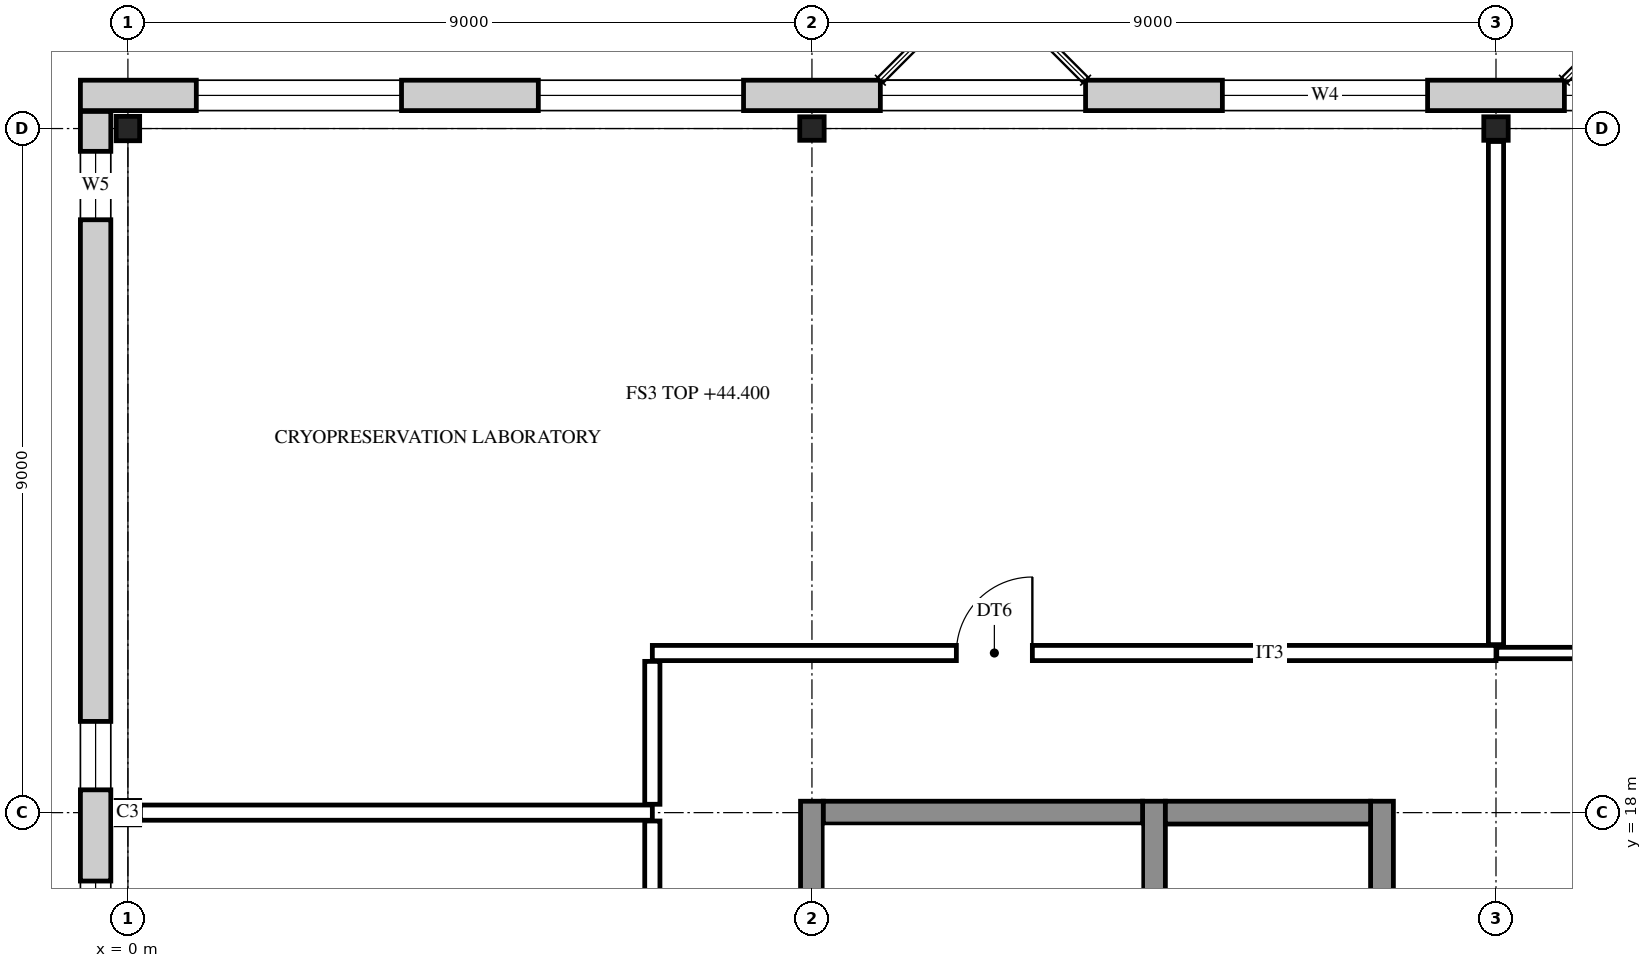
"""IFC4 building model, lengths in metres.
Left out: names, types, materials, properties, quantities, classifications, styles, units other than length and angle.
Written with IfcOpenShell. Run it as: python <this file> out.ifc"""

import sys

from ifc_helpers import new_model, si_unit, direction, frame, frame_2d, origin, origin_2d, place, context, subcontext, project, spatial, rectangle, i_section, extrude, element, fill, save


model = new_model("IFC4")
c1 = context("Model", 3, precision=1e-05, world=origin(), true_north=direction((0.0, 1.0)))
c2 = subcontext(c1, "Body", "Model", "MODEL_VIEW")
j1 = project(units=[si_unit("LENGTHUNIT", "METRE"), si_unit("PLANEANGLEUNIT", "RADIAN")], contexts=[c1])
p1 = place(None, origin())
s1 = spatial("IfcSite", under=j1, at=p1, CompositionType="ELEMENT")
p2 = place(p1, origin())
s2 = spatial("IfcBuilding", under=s1, at=p2, CompositionType="ELEMENT")
p3 = place(p2, frame((0.0, 0.0, 44.4)))
s3 = spatial("IfcBuildingStorey", under=s2, at=p3, CompositionType="ELEMENT", Elevation=44.4)
for number, where, z_axis, x_axis in (
    (1, (0.0, 18.0, 0.0), (0.0, 0.0, 1.0), (1.0, 0.0, 0.0)),
    (2, (0.0, 27.0, 0.0), (0.0, 0.0, 1.0), (1.0, 0.0, 0.0)),
    (3, (9.0, 27.0, 0.0), (0.0, 0.0, 1.0), (0.0, 1.0, 0.0)),
    (4, (18.0, 27.0, 0.0), (0.0, 0.0, 1.0), (0.0, 1.0, 0.0)),
):
    element("IfcColumn", number, at=place(p3, frame(where, z_axis=z_axis, x_axis=x_axis)), inside=s3, PredefinedType="COLUMN", context=c2, shape_type="SweptSolid", body=[
        extrude(i_section(OverallWidth=0.309, OverallDepth=0.321, WebThickness=0.014, FlangeThickness=0.022, FilletRadius=0.017, at=origin_2d()), origin(), (0.0, 0.0, 1.0), 4.2),
    ])
for number, where, z_axis, x_axis in (
    (5, (9.0, 8.85, 0.0), (0.0, 0.0, 1.0), (0.0, 1.0, 0.0)),
    (6, (13.5, 8.85, 0.0), (0.0, 0.0, 1.0), (0.0, 1.0, 0.0)),
):
    element("IfcWall", number, at=place(p3, frame(where, z_axis=z_axis, x_axis=x_axis)), inside=s3, PredefinedType="SHEAR", context=c2, shape_type="SweptSolid", body=[
        extrude(rectangle(XDim=9.3, YDim=0.3, at=frame_2d((4.65, 0.0))), origin(), (0.0, 0.0, 1.0), 4.2),
    ])
p4 = place(p3, frame((16.5, 8.85, 0.0), z_axis=(0.0, 0.0, 1.0), x_axis=(0.0, 1.0, 0.0)))
e7 = element("IfcWall", 7, at=p4, inside=s3, PredefinedType="SHEAR", context=c2, shape_type="SweptSolid", body=[
    extrude(rectangle(XDim=9.3, YDim=0.3, at=frame_2d((4.65, 0.0))), origin(), (0.0, 0.0, 1.0), 4.2),
])
p5 = place(p4, frame((1.1, 0.0, 0.0)))
e8 = element("IfcOpeningElement", 8, at=p5, cuts=e7, PredefinedType="OPENING", context=c2, shape_type="SweptSolid", body=[
    extrude(rectangle(XDim=1.1, YDim=2.1, at=frame_2d((0.55, 1.05))), frame((0.0, 0.16, 0.0), z_axis=(0.0, -1.0, 0.0), x_axis=(1.0, 0.0, 0.0)), (0.0, 0.0, 1.0), 0.32),
])
p6 = place(p4, frame((4.1, 0.0, 0.0)))
e9 = element("IfcOpeningElement", 9, at=p6, cuts=e7, PredefinedType="OPENING", context=c2, shape_type="SweptSolid", body=[
    extrude(rectangle(XDim=1.1, YDim=2.1, at=frame_2d((0.55, 1.05))), frame((0.0, 0.16, 0.0), z_axis=(0.0, -1.0, 0.0), x_axis=(1.0, 0.0, 0.0)), (0.0, 0.0, 1.0), 0.32),
])
p7 = place(p3, frame((9.15, 18.0, 0.0), z_axis=(0.0, 0.0, 1.0), x_axis=(1.0, 0.0, 0.0)))
e10 = element("IfcWall", 10, at=p7, inside=s3, PredefinedType="SHEAR", context=c2, shape_type="SweptSolid", body=[
    extrude(rectangle(XDim=4.2, YDim=0.3, at=frame_2d((2.1, 0.0))), origin(), (0.0, 0.0, 1.0), 4.2),
])
p8 = place(p3, frame((13.65, 18.0, 0.0), z_axis=(0.0, 0.0, 1.0), x_axis=(1.0, 0.0, 0.0)))
e11 = element("IfcWall", 11, at=p8, inside=s3, PredefinedType="SHEAR", context=c2, shape_type="SweptSolid", body=[
    extrude(rectangle(XDim=2.7, YDim=0.3, at=frame_2d((1.35, 0.0))), origin(), (0.0, 0.0, 1.0), 4.2),
])
p9 = place(p3, frame((-0.425, -0.225, 0.0), z_axis=(0.0, 0.0, 1.0), x_axis=(0.0, 1.0, 0.0)))
e12 = element("IfcWall", 12, at=p9, inside=s3, PredefinedType="STANDARD", context=c2, shape_type="SweptSolid", body=[
    extrude(rectangle(XDim=27.45, YDim=0.4, at=frame_2d((13.725, 0.0))), origin(), (0.0, 0.0, 1.0), 4.2),
])
p10 = place(p9, frame((0.525, 0.0, 0.9)))
e13 = element("IfcOpeningElement", 13, at=p10, cuts=e12, PredefinedType="OPENING", context=c2, shape_type="SweptSolid", body=[
    extrude(rectangle(XDim=0.9, YDim=2.0, at=frame_2d((0.45, 1.0))), frame((0.0, 0.21, 0.0), z_axis=(0.0, -1.0, 0.0), x_axis=(1.0, 0.0, 0.0)), (0.0, 0.0, 1.0), 0.42),
])
p11 = place(p9, frame((8.025, 0.0, 0.9)))
e14 = element("IfcOpeningElement", 14, at=p11, cuts=e12, PredefinedType="OPENING", context=c2, shape_type="SweptSolid", body=[
    extrude(rectangle(XDim=0.9, YDim=2.0, at=frame_2d((0.45, 1.0))), frame((0.0, 0.21, 0.0), z_axis=(0.0, -1.0, 0.0), x_axis=(1.0, 0.0, 0.0)), (0.0, 0.0, 1.0), 0.42),
])
p12 = place(p9, frame((10.125, 0.0, 0.9)))
e15 = element("IfcOpeningElement", 15, at=p12, cuts=e12, PredefinedType="OPENING", context=c2, shape_type="SweptSolid", body=[
    extrude(rectangle(XDim=2.7, YDim=2.5, at=frame_2d((1.35, 1.25))), frame((0.0, 0.21, 0.0), z_axis=(0.0, -1.0, 0.0), x_axis=(1.0, 0.0, 0.0)), (0.0, 0.0, 1.0), 0.42),
])
p13 = place(p9, frame((14.625, 0.0, 0.9)))
e16 = element("IfcOpeningElement", 16, at=p13, cuts=e12, PredefinedType="OPENING", context=c2, shape_type="SweptSolid", body=[
    extrude(rectangle(XDim=2.7, YDim=2.5, at=frame_2d((1.35, 1.25))), frame((0.0, 0.21, 0.0), z_axis=(0.0, -1.0, 0.0), x_axis=(1.0, 0.0, 0.0)), (0.0, 0.0, 1.0), 0.42),
])
p14 = place(p9, frame((18.525, 0.0, 0.9)))
e17 = element("IfcOpeningElement", 17, at=p14, cuts=e12, PredefinedType="OPENING", context=c2, shape_type="SweptSolid", body=[
    extrude(rectangle(XDim=0.9, YDim=2.0, at=frame_2d((0.45, 1.0))), frame((0.0, 0.21, 0.0), z_axis=(0.0, -1.0, 0.0), x_axis=(1.0, 0.0, 0.0)), (0.0, 0.0, 1.0), 0.42),
])
p15 = place(p9, frame((26.025, 0.0, 0.9)))
e18 = element("IfcOpeningElement", 18, at=p15, cuts=e12, PredefinedType="OPENING", context=c2, shape_type="SweptSolid", body=[
    extrude(rectangle(XDim=0.9, YDim=2.0, at=frame_2d((0.45, 1.0))), frame((0.0, 0.21, 0.0), z_axis=(0.0, -1.0, 0.0), x_axis=(1.0, 0.0, 0.0)), (0.0, 0.0, 1.0), 0.42),
])
p16 = place(p3, frame((-0.625, 27.436, 0.0), z_axis=(0.0, 0.0, 1.0), x_axis=(1.0, 0.0, 0.0)))
e19 = element("IfcWall", 19, at=p16, inside=s3, PredefinedType="STANDARD", context=c2, shape_type="SweptSolid", body=[
    extrude(rectangle(XDim=32.75, YDim=0.4, at=frame_2d((16.375, 0.0))), origin(), (0.0, 0.0, 1.0), 4.2),
])
p17 = place(p16, frame((1.525, 0.0, 0.9)))
e20 = element("IfcOpeningElement", 20, at=p17, cuts=e19, PredefinedType="OPENING", context=c2, shape_type="SweptSolid", body=[
    extrude(rectangle(XDim=2.7, YDim=2.5, at=frame_2d((1.35, 1.25))), frame((0.0, 0.21, 0.0), z_axis=(0.0, -1.0, 0.0), x_axis=(1.0, 0.0, 0.0)), (0.0, 0.0, 1.0), 0.42),
])
p18 = place(p16, frame((6.025, 0.0, 0.9)))
e21 = element("IfcOpeningElement", 21, at=p18, cuts=e19, PredefinedType="OPENING", context=c2, shape_type="SweptSolid", body=[
    extrude(rectangle(XDim=2.7, YDim=2.5, at=frame_2d((1.35, 1.25))), frame((0.0, 0.21, 0.0), z_axis=(0.0, -1.0, 0.0), x_axis=(1.0, 0.0, 0.0)), (0.0, 0.0, 1.0), 0.42),
])
p19 = place(p16, frame((10.525, 0.0, 0.9)))
e22 = element("IfcOpeningElement", 22, at=p19, cuts=e19, PredefinedType="OPENING", context=c2, shape_type="SweptSolid", body=[
    extrude(rectangle(XDim=2.7, YDim=2.5, at=frame_2d((1.35, 1.25))), frame((0.0, 0.21, 0.0), z_axis=(0.0, -1.0, 0.0), x_axis=(1.0, 0.0, 0.0)), (0.0, 0.0, 1.0), 0.42),
])
p20 = place(p16, frame((15.025, 0.0, 0.9)))
e23 = element("IfcOpeningElement", 23, at=p20, cuts=e19, PredefinedType="OPENING", context=c2, shape_type="SweptSolid", body=[
    extrude(rectangle(XDim=2.7, YDim=2.5, at=frame_2d((1.35, 1.25))), frame((0.0, 0.21, 0.0), z_axis=(0.0, -1.0, 0.0), x_axis=(1.0, 0.0, 0.0)), (0.0, 0.0, 1.0), 0.42),
])
p21 = place(p16, frame((19.525, 0.0, 0.9)))
e24 = element("IfcOpeningElement", 24, at=p21, cuts=e19, PredefinedType="OPENING", context=c2, shape_type="SweptSolid", body=[
    extrude(rectangle(XDim=2.7, YDim=2.5, at=frame_2d((1.35, 1.25))), frame((0.0, 0.21, 0.0), z_axis=(0.0, -1.0, 0.0), x_axis=(1.0, 0.0, 0.0)), (0.0, 0.0, 1.0), 0.42),
])
p22 = place(p16, frame((24.025, 0.0, 0.9)))
e25 = element("IfcOpeningElement", 25, at=p22, cuts=e19, PredefinedType="OPENING", context=c2, shape_type="SweptSolid", body=[
    extrude(rectangle(XDim=2.7, YDim=2.5, at=frame_2d((1.35, 1.25))), frame((0.0, 0.21, 0.0), z_axis=(0.0, -1.0, 0.0), x_axis=(1.0, 0.0, 0.0)), (0.0, 0.0, 1.0), 0.42),
])
p23 = place(p16, frame((28.525, 0.0, 0.9)))
e26 = element("IfcOpeningElement", 26, at=p23, cuts=e19, PredefinedType="OPENING", context=c2, shape_type="SweptSolid", body=[
    extrude(rectangle(XDim=2.7, YDim=2.5, at=frame_2d((1.35, 1.25))), frame((0.0, 0.21, 0.0), z_axis=(0.0, -1.0, 0.0), x_axis=(1.0, 0.0, 0.0)), (0.0, 0.0, 1.0), 0.42),
])
p24 = place(p3, frame((6.9, 13.61, 0.0), z_axis=(0.0, 0.0, 1.0), x_axis=(0.0, 1.0, 0.0)))
e27 = element("IfcWall", 27, at=p24, inside=s3, PredefinedType="PARTITIONING", context=c2, shape_type="SweptSolid", body=[
    extrude(rectangle(XDim=4.28, YDim=0.2, at=frame_2d((2.14, 0.0))), origin(), (0.0, 0.0, 1.0), 3.542),
])
p25 = place(p24, frame((1.64, 0.0, 0.0)))
e28 = element("IfcOpeningElement", 28, at=p25, cuts=e27, PredefinedType="OPENING", context=c2, shape_type="SweptSolid", body=[
    extrude(rectangle(XDim=1.0, YDim=2.1, at=frame_2d((0.5, 1.05))), frame((0.0, 0.11, 0.0), z_axis=(0.0, -1.0, 0.0), x_axis=(1.0, 0.0, 0.0)), (0.0, 0.0, 1.0), 0.22),
])
p26 = place(p3, frame((6.9, 18.11, 0.0), z_axis=(0.0, 0.0, 1.0), x_axis=(0.0, 1.0, 0.0)))
e29 = element("IfcWall", 29, at=p26, inside=s3, PredefinedType="PARTITIONING", context=c2, shape_type="SweptSolid", body=[
    extrude(rectangle(XDim=1.88, YDim=0.2, at=frame_2d((0.94, 0.0))), origin(), (0.0, 0.0, 1.0), 3.542),
])
p27 = place(p3, frame((18.0, 20.21, 0.0), z_axis=(0.0, 0.0, 1.0), x_axis=(0.0, 1.0, 0.0)))
e30 = element("IfcWall", 30, at=p27, inside=s3, PredefinedType="PARTITIONING", context=c2, shape_type="SweptSolid", body=[
    extrude(rectangle(XDim=6.62, YDim=0.2, at=frame_2d((3.31, 0.0))), origin(), (0.0, 0.0, 1.0), 3.542),
])
p28 = place(p3, frame((0.165, 18.0, 0.0), z_axis=(0.0, 0.0, 1.0), x_axis=(1.0, 0.0, 0.0)))
e31 = element("IfcWall", 31, at=p28, inside=s3, PredefinedType="PARTITIONING", context=c2, shape_type="SweptSolid", body=[
    extrude(rectangle(XDim=6.735, YDim=0.2, at=frame_2d((3.368, 0.0))), origin(), (0.0, 0.0, 1.0), 3.542),
])
p29 = place(p3, frame((6.9, 20.1, 0.0), z_axis=(0.0, 0.0, 1.0), x_axis=(1.0, 0.0, 0.0)))
e32 = element("IfcWall", 32, at=p29, inside=s3, PredefinedType="PARTITIONING", context=c2, shape_type="SweptSolid", body=[
    extrude(rectangle(XDim=11.1, YDim=0.2, at=frame_2d((5.55, 0.0))), origin(), (0.0, 0.0, 1.0), 3.542),
])
p30 = place(p29, frame((4.0, 0.0, 0.0)))
e33 = element("IfcOpeningElement", 33, at=p30, cuts=e32, PredefinedType="OPENING", context=c2, shape_type="SweptSolid", body=[
    extrude(rectangle(XDim=1.0, YDim=2.1, at=frame_2d((0.5, 1.05))), frame((0.0, 0.11, 0.0), z_axis=(0.0, -1.0, 0.0), x_axis=(1.0, 0.0, 0.0)), (0.0, 0.0, 1.0), 0.22),
])
p31 = place(p3, frame((18.01, 20.1, 0.0), z_axis=(0.0, 0.0, 1.0), x_axis=(1.0, 0.0, 0.0)))
e34 = element("IfcWall", 34, at=p31, inside=s3, PredefinedType="PARTITIONING", context=c2, shape_type="SweptSolid", body=[
    extrude(rectangle(XDim=8.99, YDim=0.15, at=frame_2d((4.495, 0.0))), origin(), (0.0, 0.0, 1.0), 3.542),
])
p32 = place(p31, frame((5.14, 0.0, 0.0)))
e35 = element("IfcOpeningElement", 35, at=p32, cuts=e34, PredefinedType="OPENING", context=c2, shape_type="SweptSolid", body=[
    extrude(rectangle(XDim=1.1, YDim=2.1, at=frame_2d((0.55, 1.05))), frame((0.0, 0.085, 0.0), z_axis=(0.0, -1.0, 0.0), x_axis=(1.0, 0.0, 0.0)), (0.0, 0.0, 1.0), 0.17),
])
p33 = place(p13, origin())
e36 = element("IfcWindow", 36, at=p33, inside=s3, PartitioningType="SINGLE_PANEL", PredefinedType="WINDOW", context=c2, shape_type="SweptSolid", body=[
    extrude(rectangle(XDim=2.7, YDim=2.5, at=frame_2d((1.35, 1.25))), frame((0.0, 0.03, 0.0), z_axis=(0.0, -1.0, 0.0), x_axis=(1.0, 0.0, 0.0)), (0.0, 0.0, 1.0), 0.06),
])
fill(e16, e36)
p34 = place(p14, origin())
e37 = element("IfcWindow", 37, at=p34, inside=s3, PartitioningType="SINGLE_PANEL", PredefinedType="WINDOW", context=c2, shape_type="SweptSolid", body=[
    extrude(rectangle(XDim=0.9, YDim=2.0, at=frame_2d((0.45, 1.0))), frame((0.0, 0.03, 0.0), z_axis=(0.0, -1.0, 0.0), x_axis=(1.0, 0.0, 0.0)), (0.0, 0.0, 1.0), 0.06),
])
fill(e17, e37)
p35 = place(p15, origin())
e38 = element("IfcWindow", 38, at=p35, inside=s3, PartitioningType="SINGLE_PANEL", PredefinedType="WINDOW", context=c2, shape_type="SweptSolid", body=[
    extrude(rectangle(XDim=0.9, YDim=2.0, at=frame_2d((0.45, 1.0))), frame((0.0, 0.03, 0.0), z_axis=(0.0, -1.0, 0.0), x_axis=(1.0, 0.0, 0.0)), (0.0, 0.0, 1.0), 0.06),
])
fill(e18, e38)
p36 = place(p17, origin())
e39 = element("IfcWindow", 39, at=p36, inside=s3, PartitioningType="SINGLE_PANEL", PredefinedType="WINDOW", context=c2, shape_type="SweptSolid", body=[
    extrude(rectangle(XDim=2.7, YDim=2.5, at=frame_2d((1.35, 1.25))), frame((0.0, 0.03, 0.0), z_axis=(0.0, -1.0, 0.0), x_axis=(1.0, 0.0, 0.0)), (0.0, 0.0, 1.0), 0.06),
])
fill(e20, e39)
p37 = place(p18, origin())
e40 = element("IfcWindow", 40, at=p37, inside=s3, PartitioningType="SINGLE_PANEL", PredefinedType="WINDOW", context=c2, shape_type="SweptSolid", body=[
    extrude(rectangle(XDim=2.7, YDim=2.5, at=frame_2d((1.35, 1.25))), frame((0.0, 0.03, 0.0), z_axis=(0.0, -1.0, 0.0), x_axis=(1.0, 0.0, 0.0)), (0.0, 0.0, 1.0), 0.06),
])
fill(e21, e40)
p38 = place(p19, origin())
e41 = element("IfcWindow", 41, at=p38, inside=s3, PartitioningType="SINGLE_PANEL", PredefinedType="WINDOW", context=c2, shape_type="SweptSolid", body=[
    extrude(rectangle(XDim=2.7, YDim=2.5, at=frame_2d((1.35, 1.25))), frame((0.0, 0.03, 0.0), z_axis=(0.0, -1.0, 0.0), x_axis=(1.0, 0.0, 0.0)), (0.0, 0.0, 1.0), 0.06),
])
fill(e22, e41)
p39 = place(p20, origin())
e42 = element("IfcWindow", 42, at=p39, inside=s3, PartitioningType="SINGLE_PANEL", PredefinedType="WINDOW", context=c2, shape_type="SweptSolid", body=[
    extrude(rectangle(XDim=2.7, YDim=2.5, at=frame_2d((1.35, 1.25))), frame((0.0, 0.03, 0.0), z_axis=(0.0, -1.0, 0.0), x_axis=(1.0, 0.0, 0.0)), (0.0, 0.0, 1.0), 0.06),
])
fill(e23, e42)
p40 = place(p21, origin())
e43 = element("IfcWindow", 43, at=p40, inside=s3, PartitioningType="SINGLE_PANEL", PredefinedType="WINDOW", context=c2, shape_type="SweptSolid", body=[
    extrude(rectangle(XDim=2.7, YDim=2.5, at=frame_2d((1.35, 1.25))), frame((0.0, 0.03, 0.0), z_axis=(0.0, -1.0, 0.0), x_axis=(1.0, 0.0, 0.0)), (0.0, 0.0, 1.0), 0.06),
])
fill(e24, e43)
p41 = place(p30, origin())
e44 = element("IfcDoor", 44, at=p41, inside=s3, OperationType="SINGLE_SWING_RIGHT", PredefinedType="DOOR", context=c2, shape_type="SweptSolid", body=[
    extrude(rectangle(XDim=1.0, YDim=2.1, at=frame_2d((0.5, 1.05))), frame((0.0, 0.025, 0.0), z_axis=(0.0, -1.0, 0.0), x_axis=(1.0, 0.0, 0.0)), (0.0, 0.0, 1.0), 0.05),
])
fill(e33, e44)
save(model, sys.argv[1])
